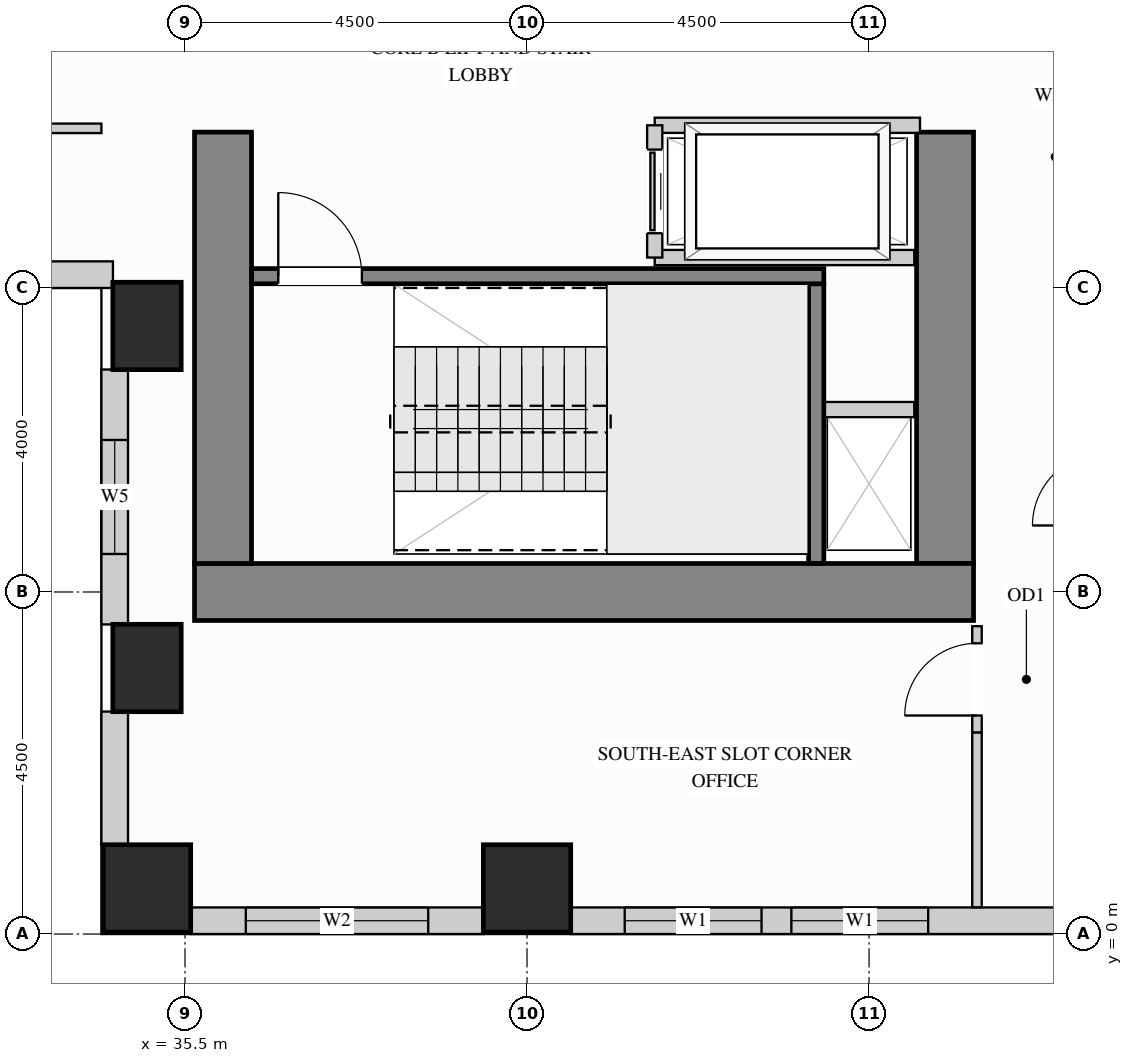
"""IFC4 building model, lengths in metres.
Left out: names, types, materials, properties, quantities, classifications, styles, units other than length and angle.
Written with IfcOpenShell. Run it as: python <this file> out.ifc"""

import sys

from ifc_helpers import new_model, si_unit, direction, frame, frame_2d, origin, origin_2d, place, context, subcontext, project, spatial, rectangle, extrude, source, transform, mapped, element, fill, save


model = new_model("IFC4")
c1 = context("Model", 3, precision=1e-05, world=origin(), true_north=direction((0.0, 1.0)))
c2 = subcontext(c1, "Body", "Model", "MODEL_VIEW")
j1 = project(units=[si_unit("LENGTHUNIT", "METRE"), si_unit("PLANEANGLEUNIT", "RADIAN")], contexts=[c1])
p1 = place(None, origin())
s1 = spatial("IfcSite", under=j1, at=p1, CompositionType="ELEMENT")
p2 = place(p1, origin())
s2 = spatial("IfcBuilding", under=s1, at=p2, CompositionType="ELEMENT")
p3 = place(p2, frame((0.0, 0.0, 99.0)))
s3 = spatial("IfcBuildingStorey", under=s2, at=p3, CompositionType="ELEMENT", Elevation=99.0)
m1 = source(origin(), c2, "Body", "SweptSolid", [
    extrude(rectangle(XDim=0.9, YDim=1.15, at=origin_2d()), origin(), (0.0, 0.0, 1.0), 3.38),
])
for number, where, z_axis, x_axis in (
    (1, (35.0, 3.5, 0.0), (0.0, 0.0, 1.0), (1.0, 0.0, 0.0)),
    (2, (35.0, 8.0, 0.0), (0.0, 0.0, 1.0), (1.0, 0.0, 0.0)),
):
    element("IfcColumn", number, at=place(p3, frame(where, z_axis=z_axis, x_axis=x_axis)), inside=s3, PredefinedType="COLUMN", context=c2, shape_type="MappedRepresentation", body=[
        mapped(m1, transform((0.0, 0.0, 0.0), x_axis=(1.0, 0.0, 0.0), y_axis=(0.0, 1.0, 0.0), z_axis=(0.0, 0.0, 1.0))),
    ])
m2 = source(origin(), c2, "Body", "SweptSolid", [
    extrude(rectangle(XDim=1.15, YDim=1.15, at=origin_2d()), origin(), (0.0, 0.0, 1.0), 3.38),
])
for number, where, z_axis, x_axis in (
    (3, (35.0, 0.6, 0.0), (0.0, 0.0, 1.0), (1.0, 0.0, 0.0)),
    (4, (40.0, 0.6, 0.0), (0.0, 0.0, 1.0), (1.0, 0.0, 0.0)),
):
    element("IfcColumn", number, at=place(p3, frame(where, z_axis=z_axis, x_axis=x_axis)), inside=s3, PredefinedType="COLUMN", context=c2, shape_type="MappedRepresentation", body=[
        mapped(m2, transform((0.0, 0.0, 0.0), x_axis=(1.0, 0.0, 0.0), y_axis=(0.0, 1.0, 0.0), z_axis=(0.0, 0.0, 1.0))),
    ])
m3 = source(origin(), c2, "Body", "SweptSolid", [
    extrude(rectangle(XDim=5.675, YDim=0.75, at=frame_2d((2.837, 0.0))), origin(), (0.0, 0.0, 1.0), 3.38),
])
p4 = place(p3, frame((45.5, 4.875, 0.0), z_axis=(0.0, 0.0, 1.0), x_axis=(0.0, 1.0, 0.0)))
e5 = element("IfcWall", 5, at=p4, inside=s3, PredefinedType="SHEAR", context=c2, shape_type="MappedRepresentation", body=[
    mapped(m3, transform((0.0, 0.0, 0.0), x_axis=(1.0, 0.0, 0.0), y_axis=(0.0, 1.0, 0.0), z_axis=(0.0, 0.0, 1.0))),
])
m4 = source(origin(), c2, "Body", "SweptSolid", [
    extrude(rectangle(XDim=10.25, YDim=0.75, at=frame_2d((5.125, 0.0))), origin(), (0.0, 0.0, 1.0), 3.38),
])
p5 = place(p3, frame((35.625, 4.5, 0.0), z_axis=(0.0, 0.0, 1.0), x_axis=(1.0, 0.0, 0.0)))
e6 = element("IfcWall", 6, at=p5, inside=s3, PredefinedType="SHEAR", context=c2, shape_type="MappedRepresentation", body=[
    mapped(m4, transform((0.0, 0.0, 0.0), x_axis=(1.0, 0.0, 0.0), y_axis=(0.0, 1.0, 0.0), z_axis=(0.0, 0.0, 1.0))),
])
p6 = place(p3, frame((36.0, 4.875, 0.0), z_axis=(0.0, 0.0, 1.0), x_axis=(0.0, 1.0, 0.0)))
e7 = element("IfcWall", 7, at=p6, inside=s3, PredefinedType="SHEAR", context=c2, shape_type="MappedRepresentation", body=[
    mapped(m3, transform((0.0, 0.0, 0.0), x_axis=(1.0, 0.0, 0.0), y_axis=(0.0, 1.0, 0.0), z_axis=(0.0, 0.0, 1.0))),
])
p7 = place(p3, frame((30.948, 8.675, 0.0), z_axis=(0.0, 0.0, 1.0), x_axis=(1.0, 0.0, 0.0)))
e8 = element("IfcWall", 8, at=p7, inside=s3, PredefinedType="SOLIDWALL", context=c2, shape_type="SweptSolid", body=[
    extrude(rectangle(XDim=3.604, YDim=0.35, at=frame_2d((1.802, 0.0))), origin(), (0.0, 0.0, 1.0), 3.365),
])
p8 = place(p7, frame((1.052, 0.0, 0.78)))
e9 = element("IfcOpeningElement", 9, at=p8, cuts=e8, PredefinedType="OPENING", context=c2, shape_type="SweptSolid", body=[
    extrude(rectangle(XDim=1.5, YDim=2.0, at=frame_2d((0.75, 1.0))), frame((0.0, 0.185, 0.0), z_axis=(0.0, -1.0, 0.0), x_axis=(1.0, 0.0, 0.0)), (0.0, 0.0, 1.0), 0.37),
])
p9 = place(p3, frame((34.575, 7.427, 0.0), z_axis=(0.0, 0.0, 1.0), x_axis=(0.0, -1.0, 0.0)))
e10 = element("IfcWall", 10, at=p9, inside=s3, PredefinedType="SOLIDWALL", context=c2, shape_type="SweptSolid", body=[
    extrude(rectangle(XDim=3.354, YDim=0.35, at=frame_2d((1.677, 0.0))), origin(), (0.0, 0.0, 1.0), 3.365),
])
p10 = place(p9, frame((0.927, 0.0, 0.78)))
e11 = element("IfcOpeningElement", 11, at=p10, cuts=e10, PredefinedType="OPENING", context=c2, shape_type="SweptSolid", body=[
    extrude(rectangle(XDim=1.5, YDim=2.0, at=frame_2d((0.75, 1.0))), frame((0.0, 0.185, 0.0), z_axis=(0.0, -1.0, 0.0), x_axis=(1.0, 0.0, 0.0)), (0.0, 0.0, 1.0), 0.37),
])
m5 = source(origin(), c2, "Body", "SweptSolid", [
    extrude(rectangle(XDim=1.754, YDim=0.35, at=frame_2d((0.877, 0.0))), origin(), (0.0, 0.0, 1.0), 3.365),
])
p11 = place(p3, frame((34.575, 2.927, 0.0), z_axis=(0.0, 0.0, 1.0), x_axis=(0.0, -1.0, 0.0)))
e12 = element("IfcWall", 12, at=p11, inside=s3, PredefinedType="SOLIDWALL", context=c2, shape_type="MappedRepresentation", body=[
    mapped(m5, transform((0.0, 0.0, 0.0), x_axis=(1.0, 0.0, 0.0), y_axis=(0.0, 1.0, 0.0), z_axis=(0.0, 0.0, 1.0))),
])
p12 = place(p3, frame((35.573, 0.175, 0.0), z_axis=(0.0, 0.0, 1.0), x_axis=(1.0, 0.0, 0.0)))
e13 = element("IfcWall", 13, at=p12, inside=s3, PredefinedType="SOLIDWALL", context=c2, shape_type="SweptSolid", body=[
    extrude(rectangle(XDim=3.854, YDim=0.35, at=frame_2d((1.927, 0.0))), origin(), (0.0, 0.0, 1.0), 3.365),
])
p13 = place(p12, frame((0.727, 0.0, 0.78)))
e14 = element("IfcOpeningElement", 14, at=p13, cuts=e13, PredefinedType="OPENING", context=c2, shape_type="SweptSolid", body=[
    extrude(rectangle(XDim=2.4, YDim=2.1, at=frame_2d((1.2, 1.05))), frame((0.0, 0.185, 0.0), z_axis=(0.0, -1.0, 0.0), x_axis=(1.0, 0.0, 0.0)), (0.0, 0.0, 1.0), 0.37),
])
p14 = place(p3, frame((40.573, 0.175, 0.0), z_axis=(0.0, 0.0, 1.0), x_axis=(1.0, 0.0, 0.0)))
e15 = element("IfcWall", 15, at=p14, inside=s3, PredefinedType="SOLIDWALL", context=c2, shape_type="SweptSolid", body=[
    extrude(rectangle(XDim=6.454, YDim=0.35, at=frame_2d((3.227, 0.0))), origin(), (0.0, 0.0, 1.0), 3.365),
])
p15 = place(p14, frame((0.712, 0.0, 0.78)))
e16 = element("IfcOpeningElement", 16, at=p15, cuts=e15, PredefinedType="OPENING", context=c2, shape_type="SweptSolid", body=[
    extrude(rectangle(XDim=1.8, YDim=2.1, at=frame_2d((0.9, 1.05))), frame((0.0, 0.185, 0.0), z_axis=(0.0, -1.0, 0.0), x_axis=(1.0, 0.0, 0.0)), (0.0, 0.0, 1.0), 0.37),
])
p16 = place(p14, frame((2.905, 0.0, 0.78)))
e17 = element("IfcOpeningElement", 17, at=p16, cuts=e15, PredefinedType="OPENING", context=c2, shape_type="SweptSolid", body=[
    extrude(rectangle(XDim=1.8, YDim=2.1, at=frame_2d((0.9, 1.05))), frame((0.0, 0.185, 0.0), z_axis=(0.0, -1.0, 0.0), x_axis=(1.0, 0.0, 0.0)), (0.0, 0.0, 1.0), 0.37),
])
p17 = place(p3, frame((45.92, 2.65, 0.0), z_axis=(0.0, 0.0, 1.0), x_axis=(0.0, 1.0, 0.0)))
e18 = element("IfcWall", 18, at=p17, inside=s3, PredefinedType="PARTITIONING", context=c2, shape_type="SweptSolid", body=[
    extrude(rectangle(XDim=1.4, YDim=0.125, at=frame_2d((0.7, 0.0))), origin(), (0.0, 0.0, 1.0), 3.365),
])
p18 = place(p17, frame((0.225, 0.0, 0.0)))
e19 = element("IfcOpeningElement", 19, at=p18, cuts=e18, PredefinedType="OPENING", context=c2, shape_type="SweptSolid", body=[
    extrude(rectangle(XDim=0.95, YDim=2.15, at=frame_2d((0.475, 1.075))), frame((0.0, 0.073, 0.0), z_axis=(0.0, -1.0, 0.0), x_axis=(1.0, 0.0, 0.0)), (0.0, 0.0, 1.0), 0.145),
])
m6 = source(origin(), c2, "Body", "SweptSolid", [
    extrude(rectangle(XDim=2.298, YDim=0.125, at=frame_2d((1.149, 0.0))), origin(), (0.0, 0.0, 1.0), 3.365),
])
p19 = place(p3, frame((45.92, 0.352, 0.0), z_axis=(0.0, 0.0, 1.0), x_axis=(0.0, 1.0, 0.0)))
e20 = element("IfcWall", 20, at=p19, inside=s3, PredefinedType="PARTITIONING", context=c2, shape_type="MappedRepresentation", body=[
    mapped(m6, transform((0.0, 0.0, 0.0), x_axis=(1.0, 0.0, 0.0), y_axis=(0.0, 1.0, 0.0), z_axis=(0.0, 0.0, 1.0))),
])
p20 = place(p3, frame((26.95, 10.6, 0.0), z_axis=(0.0, 0.0, 1.0), x_axis=(1.0, 0.0, 0.0)))
e21 = element("IfcWall", 21, at=p20, inside=s3, PredefinedType="PARTITIONING", context=c2, shape_type="SweptSolid", body=[
    extrude(rectangle(XDim=7.45, YDim=0.125, at=frame_2d((3.725, 0.0))), origin(), (0.0, 0.0, 1.0), 3.365),
])
p21 = place(p20, frame((4.683, 0.0, 0.0)))
e22 = element("IfcOpeningElement", 22, at=p21, cuts=e21, PredefinedType="OPENING", context=c2, shape_type="SweptSolid", body=[
    extrude(rectangle(XDim=0.95, YDim=2.15, at=frame_2d((0.475, 1.075))), frame((0.0, 0.073, 0.0), z_axis=(0.0, -1.0, 0.0), x_axis=(1.0, 0.0, 0.0)), (0.0, 0.0, 1.0), 0.145),
])
m7 = source(origin(), c2, "Body", "SweptSolid", [
    extrude(rectangle(XDim=1.245, YDim=0.2, at=frame_2d((0.623, 0.0))), origin(), (0.0, 0.0, 1.0), 3.365),
])
p22 = place(p3, frame((43.85, 6.9, 0.0), z_axis=(0.0, 0.0, 1.0), x_axis=(1.0, 0.0, 0.0)))
e23 = element("IfcWall", 23, at=p22, inside=s3, PredefinedType="PARTITIONING", context=c2, shape_type="MappedRepresentation", body=[
    mapped(m7, transform((0.0, 0.0, 0.0), x_axis=(1.0, 0.0, 0.0), y_axis=(0.0, 1.0, 0.0), z_axis=(0.0, 0.0, 1.0))),
])
m8 = source(origin(), c2, "Body", "SweptSolid", [
    extrude(rectangle(XDim=3.49, YDim=0.2, at=frame_2d((1.745, 0.0))), origin(), (0.0, 0.0, 1.0), 3.365),
])
p23 = place(p3, frame((41.68, 10.64, 0.0), z_axis=(0.0, 0.0, 1.0), x_axis=(1.0, 0.0, 0.0)))
e24 = element("IfcWall", 24, at=p23, inside=s3, PredefinedType="PARTITIONING", context=c2, shape_type="MappedRepresentation", body=[
    mapped(m8, transform((0.0, 0.0, 0.0), x_axis=(1.0, 0.0, 0.0), y_axis=(0.0, 1.0, 0.0), z_axis=(0.0, 0.0, 1.0))),
])
m9 = source(origin(), c2, "Body", "SweptSolid", [
    extrude(rectangle(XDim=3.415, YDim=0.2, at=frame_2d((1.708, 0.0))), origin(), (0.0, 0.0, 1.0), 3.365),
])
p24 = place(p3, frame((41.68, 8.9, 0.0), z_axis=(0.0, 0.0, 1.0), x_axis=(1.0, 0.0, 0.0)))
e25 = element("IfcWall", 25, at=p24, inside=s3, PredefinedType="PARTITIONING", context=c2, shape_type="MappedRepresentation", body=[
    mapped(m9, transform((0.0, 0.0, 0.0), x_axis=(1.0, 0.0, 0.0), y_axis=(0.0, 1.0, 0.0), z_axis=(0.0, 0.0, 1.0))),
])
p25 = place(p3, frame((41.68, 8.9, 0.0), z_axis=(0.0, 0.0, 1.0), x_axis=(0.0, 1.0, 0.0)))
e26 = element("IfcWall", 26, at=p25, inside=s3, PredefinedType="PARTITIONING", context=c2, shape_type="SweptSolid", body=[
    extrude(rectangle(XDim=1.74, YDim=0.2, at=frame_2d((0.87, 0.0))), origin(), (0.0, 0.0, 1.0), 3.365),
])
p26 = place(p25, frame((0.32, 0.0, 0.0)))
e27 = element("IfcOpeningElement", 27, at=p26, cuts=e26, PredefinedType="OPENING", context=c2, shape_type="SweptSolid", body=[
    extrude(rectangle(XDim=1.1, YDim=2.2, at=frame_2d((0.55, 1.1))), frame((0.0, 0.11, 0.0), z_axis=(0.0, -1.0, 0.0), x_axis=(1.0, 0.0, 0.0)), (0.0, 0.0, 1.0), 0.22),
])
m10 = source(origin(), c2, "Body", "SweptSolid", [
    extrude(rectangle(XDim=3.678, YDim=0.2, at=frame_2d((1.839, 0.0))), origin(), (0.0, 0.0, 1.0), 3.38),
])
p27 = place(p3, frame((43.805, 4.877, 0.0), z_axis=(0.0, 0.0, 1.0), x_axis=(0.0, 1.0, 0.0)))
e28 = element("IfcWall", 28, at=p27, inside=s3, PredefinedType="SHEAR", context=c2, shape_type="MappedRepresentation", body=[
    mapped(m10, transform((0.0, 0.0, 0.0), x_axis=(1.0, 0.0, 0.0), y_axis=(0.0, 1.0, 0.0), z_axis=(0.0, 0.0, 1.0))),
])
p28 = place(p3, frame((36.377, 8.655, 0.0), z_axis=(0.0, 0.0, 1.0), x_axis=(1.0, 0.0, 0.0)))
e29 = element("IfcWall", 29, at=p28, inside=s3, PredefinedType="SHEAR", context=c2, shape_type="SweptSolid", body=[
    extrude(rectangle(XDim=7.528, YDim=0.2, at=frame_2d((3.764, 0.0))), origin(), (0.0, 0.0, 1.0), 3.38),
])
p29 = place(p28, frame((0.35, 0.0, 0.0)))
e30 = element("IfcOpeningElement", 30, at=p29, cuts=e29, PredefinedType="OPENING", context=c2, shape_type="SweptSolid", body=[
    extrude(rectangle(XDim=1.1, YDim=2.15, at=frame_2d((0.55, 1.075))), frame((0.0, 0.11, 0.0), z_axis=(0.0, -1.0, 0.0), x_axis=(1.0, 0.0, 0.0)), (0.0, 0.0, 1.0), 0.22),
])
m11 = source(origin(), c2, "Body", "SweptSolid", [
    extrude(rectangle(XDim=1.1, YDim=2.2, at=frame_2d((0.55, 1.1))), frame((0.0, 0.025, 0.0), z_axis=(0.0, -1.0, 0.0), x_axis=(1.0, 0.0, 0.0)), (0.0, 0.0, 1.0), 0.05),
])
p30 = place(p26, origin())
e31 = element("IfcDoor", 31, at=p30, inside=s3, OperationType="SLIDING_TO_LEFT", PredefinedType="DOOR", context=c2, shape_type="MappedRepresentation", body=[
    mapped(m11, transform((0.0, 0.0, 0.0), x_axis=(1.0, 0.0, 0.0), y_axis=(0.0, 1.0, 0.0), z_axis=(0.0, 0.0, 1.0))),
])
fill(e27, e31)
m12 = source(origin(), c2, "Body", "SweptSolid", [
    extrude(rectangle(XDim=0.95, YDim=2.15, at=frame_2d((0.475, 1.075))), frame((0.0, 0.025, 0.0), z_axis=(0.0, -1.0, 0.0), x_axis=(1.0, 0.0, 0.0)), (0.0, 0.0, 1.0), 0.05),
])
p31 = place(p18, origin())
e32 = element("IfcDoor", 32, at=p31, inside=s3, OperationType="SINGLE_SWING_LEFT", PredefinedType="DOOR", context=c2, shape_type="MappedRepresentation", body=[
    mapped(m12, transform((0.0, 0.0, 0.0), x_axis=(1.0, 0.0, 0.0), y_axis=(0.0, 1.0, 0.0), z_axis=(0.0, 0.0, 1.0))),
])
fill(e19, e32)
m13 = source(origin(), c2, "Body", "SweptSolid", [
    extrude(rectangle(XDim=1.1, YDim=2.15, at=frame_2d((0.55, 1.075))), frame((0.0, 0.025, 0.0), z_axis=(0.0, -1.0, 0.0), x_axis=(1.0, 0.0, 0.0)), (0.0, 0.0, 1.0), 0.05),
])
p32 = place(p29, origin())
e33 = element("IfcDoor", 33, at=p32, inside=s3, OperationType="SINGLE_SWING_LEFT", PredefinedType="DOOR", context=c2, shape_type="MappedRepresentation", body=[
    mapped(m13, transform((0.0, 0.0, 0.0), x_axis=(1.0, 0.0, 0.0), y_axis=(0.0, 1.0, 0.0), z_axis=(0.0, 0.0, 1.0))),
])
fill(e30, e33)
m14 = source(origin(), c2, "Body", "SweptSolid", [
    extrude(rectangle(XDim=1.8, YDim=2.1, at=frame_2d((0.9, 1.05))), frame((0.0, 0.03, 0.0), z_axis=(0.0, -1.0, 0.0), x_axis=(1.0, 0.0, 0.0)), (0.0, 0.0, 1.0), 0.06),
])
p33 = place(p15, origin())
e34 = element("IfcWindow", 34, at=p33, inside=s3, PartitioningType="SINGLE_PANEL", PredefinedType="WINDOW", context=c2, shape_type="MappedRepresentation", body=[
    mapped(m14, transform((0.0, 0.0, 0.0), x_axis=(1.0, 0.0, 0.0), y_axis=(0.0, 1.0, 0.0), z_axis=(0.0, 0.0, 1.0))),
])
fill(e16, e34)
p34 = place(p16, origin())
e35 = element("IfcWindow", 35, at=p34, inside=s3, PartitioningType="SINGLE_PANEL", PredefinedType="WINDOW", context=c2, shape_type="MappedRepresentation", body=[
    mapped(m14, transform((0.0, 0.0, 0.0), x_axis=(1.0, 0.0, 0.0), y_axis=(0.0, 1.0, 0.0), z_axis=(0.0, 0.0, 1.0))),
])
fill(e17, e35)
m15 = source(origin(), c2, "Body", "SweptSolid", [
    extrude(rectangle(XDim=2.4, YDim=2.1, at=frame_2d((1.2, 1.05))), frame((0.0, 0.03, 0.0), z_axis=(0.0, -1.0, 0.0), x_axis=(1.0, 0.0, 0.0)), (0.0, 0.0, 1.0), 0.06),
])
p35 = place(p13, origin())
e36 = element("IfcWindow", 36, at=p35, inside=s3, PartitioningType="SINGLE_PANEL", PredefinedType="WINDOW", context=c2, shape_type="MappedRepresentation", body=[
    mapped(m15, transform((0.0, 0.0, 0.0), x_axis=(1.0, 0.0, 0.0), y_axis=(0.0, 1.0, 0.0), z_axis=(0.0, 0.0, 1.0))),
])
fill(e14, e36)
m16 = source(origin(), c2, "Body", "SweptSolid", [
    extrude(rectangle(XDim=1.5, YDim=2.0, at=frame_2d((0.75, 1.0))), frame((0.0, 0.03, 0.0), z_axis=(0.0, -1.0, 0.0), x_axis=(1.0, 0.0, 0.0)), (0.0, 0.0, 1.0), 0.06),
])
p36 = place(p10, origin())
e37 = element("IfcWindow", 37, at=p36, inside=s3, PartitioningType="SINGLE_PANEL", PredefinedType="WINDOW", context=c2, shape_type="MappedRepresentation", body=[
    mapped(m16, transform((0.0, 0.0, 0.0), x_axis=(1.0, 0.0, 0.0), y_axis=(0.0, 1.0, 0.0), z_axis=(0.0, 0.0, 1.0))),
])
fill(e11, e37)
save(model, sys.argv[1])
